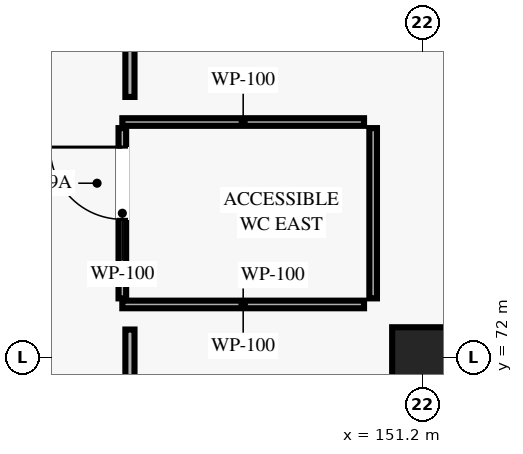
"""IFC4 building model, lengths in metres.
Left out: names, types, materials, properties, quantities, classifications, styles, units other than length and angle.
Written with IfcOpenShell. Run it as: python <this file> out.ifc"""

import sys

from ifc_helpers import new_model, si_unit, direction, frame, frame_2d, origin, origin_2d, place, context, subcontext, project, spatial, rectangle, extrude, element, fill, save


model = new_model("IFC4")
c1 = context("Model", 3, precision=1e-05, world=origin(), true_north=direction((0.0, 1.0)))
c2 = subcontext(c1, "Body", "Model", "MODEL_VIEW")
j1 = project(units=[si_unit("LENGTHUNIT", "METRE"), si_unit("PLANEANGLEUNIT", "RADIAN")], contexts=[c1])
p1 = place(None, origin())
s1 = spatial("IfcSite", under=j1, at=p1, CompositionType="ELEMENT")
p2 = place(p1, origin())
s2 = spatial("IfcBuilding", under=s1, at=p2, CompositionType="ELEMENT")
p3 = place(p2, frame((0.0, 0.0, 5.4)))
s3 = spatial("IfcBuildingStorey", under=s2, at=p3, CompositionType="ELEMENT", Elevation=5.4)
p4 = place(p3, frame((151.2, 72.0, 0.0), z_axis=(0.0, 0.0, 1.0), x_axis=(1.0, 0.0, 0.0)))
e1 = element("IfcColumn", 1, at=p4, inside=s3, PredefinedType="COLUMN", context=c2, shape_type="SweptSolid", body=[
    extrude(rectangle(XDim=0.8, YDim=0.8, at=origin_2d()), origin(), (0.0, 0.0, 1.0), 4.05),
])
p5 = place(p3, frame((147.25, 72.78, 0.0), z_axis=(0.0, 0.0, 1.0), x_axis=(0.0, 1.0, 0.0)))
e2 = element("IfcWall", 2, at=p5, inside=s3, PredefinedType="PARTITIONING", context=c2, shape_type="SweptSolid", body=[
    extrude(rectangle(XDim=2.24, YDim=0.1, at=frame_2d((1.12, 0.0))), origin(), (0.0, 0.0, 1.0), 3.81),
])
p6 = place(p5, frame((1.04, 0.0, 0.0)))
e3 = element("IfcOpeningElement", 3, at=p6, cuts=e2, PredefinedType="OPENING", context=c2, shape_type="SweptSolid", body=[
    extrude(rectangle(XDim=0.95, YDim=2.1, at=frame_2d((0.475, 1.05))), frame((0.0, 0.06, 0.0), z_axis=(0.0, -1.0, 0.0), x_axis=(1.0, 0.0, 0.0)), (0.0, 0.0, 1.0), 0.12),
])
for number, where, z_axis, x_axis in (
    (4, (147.25, 72.7, 0.0), (0.0, 0.0, 1.0), (1.0, 0.0, 0.0)),
    (5, (147.25, 75.1, 0.0), (0.0, 0.0, 1.0), (1.0, 0.0, 0.0)),
):
    element("IfcWall", number, at=place(p3, frame(where, z_axis=z_axis, x_axis=x_axis)), inside=s3, PredefinedType="PARTITIONING", context=c2, shape_type="SweptSolid", body=[
        extrude(rectangle(XDim=3.18, YDim=0.1, at=frame_2d((1.59, 0.0))), origin(), (0.0, 0.0, 1.0), 3.81),
    ])
p7 = place(p3, frame((150.55, 72.78, 0.0), z_axis=(0.0, 0.0, 1.0), x_axis=(0.0, 1.0, 0.0)))
e6 = element("IfcWall", 6, at=p7, inside=s3, PredefinedType="PARTITIONING", context=c2, shape_type="SweptSolid", body=[
    extrude(rectangle(XDim=2.24, YDim=0.1, at=frame_2d((1.12, 0.0))), origin(), (0.0, 0.0, 1.0), 3.81),
])
p8 = place(p3, frame((147.35, 57.15, 0.0), z_axis=(0.0, 0.0, 1.0), x_axis=(0.0, 1.0, 0.0)))
e7 = element("IfcWall", 7, at=p8, inside=s3, PredefinedType="PARTITIONING", context=c2, shape_type="SweptSolid", body=[
    extrude(rectangle(XDim=15.22, YDim=0.12, at=frame_2d((7.61, 0.0))), origin(), (0.0, 0.0, 1.0), 3.81),
])
p9 = place(p8, frame((3.255, 0.0, 0.0)))
e8 = element("IfcOpeningElement", 8, at=p9, cuts=e7, PredefinedType="OPENING", context=c2, shape_type="SweptSolid", body=[
    extrude(rectangle(XDim=1.7, YDim=2.2, at=frame_2d((0.85, 1.1))), frame((0.0, 0.07, 0.0), z_axis=(0.0, -1.0, 0.0), x_axis=(1.0, 0.0, 0.0)), (0.0, 0.0, 1.0), 0.14),
])
p10 = place(p3, frame((147.35, 75.43, 0.0), z_axis=(0.0, 0.0, 1.0), x_axis=(0.0, 1.0, 0.0)))
e9 = element("IfcWall", 9, at=p10, inside=s3, PredefinedType="PARTITIONING", context=c2, shape_type="SweptSolid", body=[
    extrude(rectangle(XDim=13.07, YDim=0.12, at=frame_2d((6.535, 0.0))), origin(), (0.0, 0.0, 1.0), 3.81),
])
p11 = place(p6, origin())
e10 = element("IfcDoor", 10, at=p11, inside=s3, OperationType="SINGLE_SWING_RIGHT", PredefinedType="DOOR", context=c2, shape_type="SweptSolid", body=[
    extrude(rectangle(XDim=0.95, YDim=2.1, at=frame_2d((0.475, 1.05))), frame((0.0, 0.025, 0.0), z_axis=(0.0, -1.0, 0.0), x_axis=(1.0, 0.0, 0.0)), (0.0, 0.0, 1.0), 0.05),
])
fill(e3, e10)
save(model, sys.argv[1])
